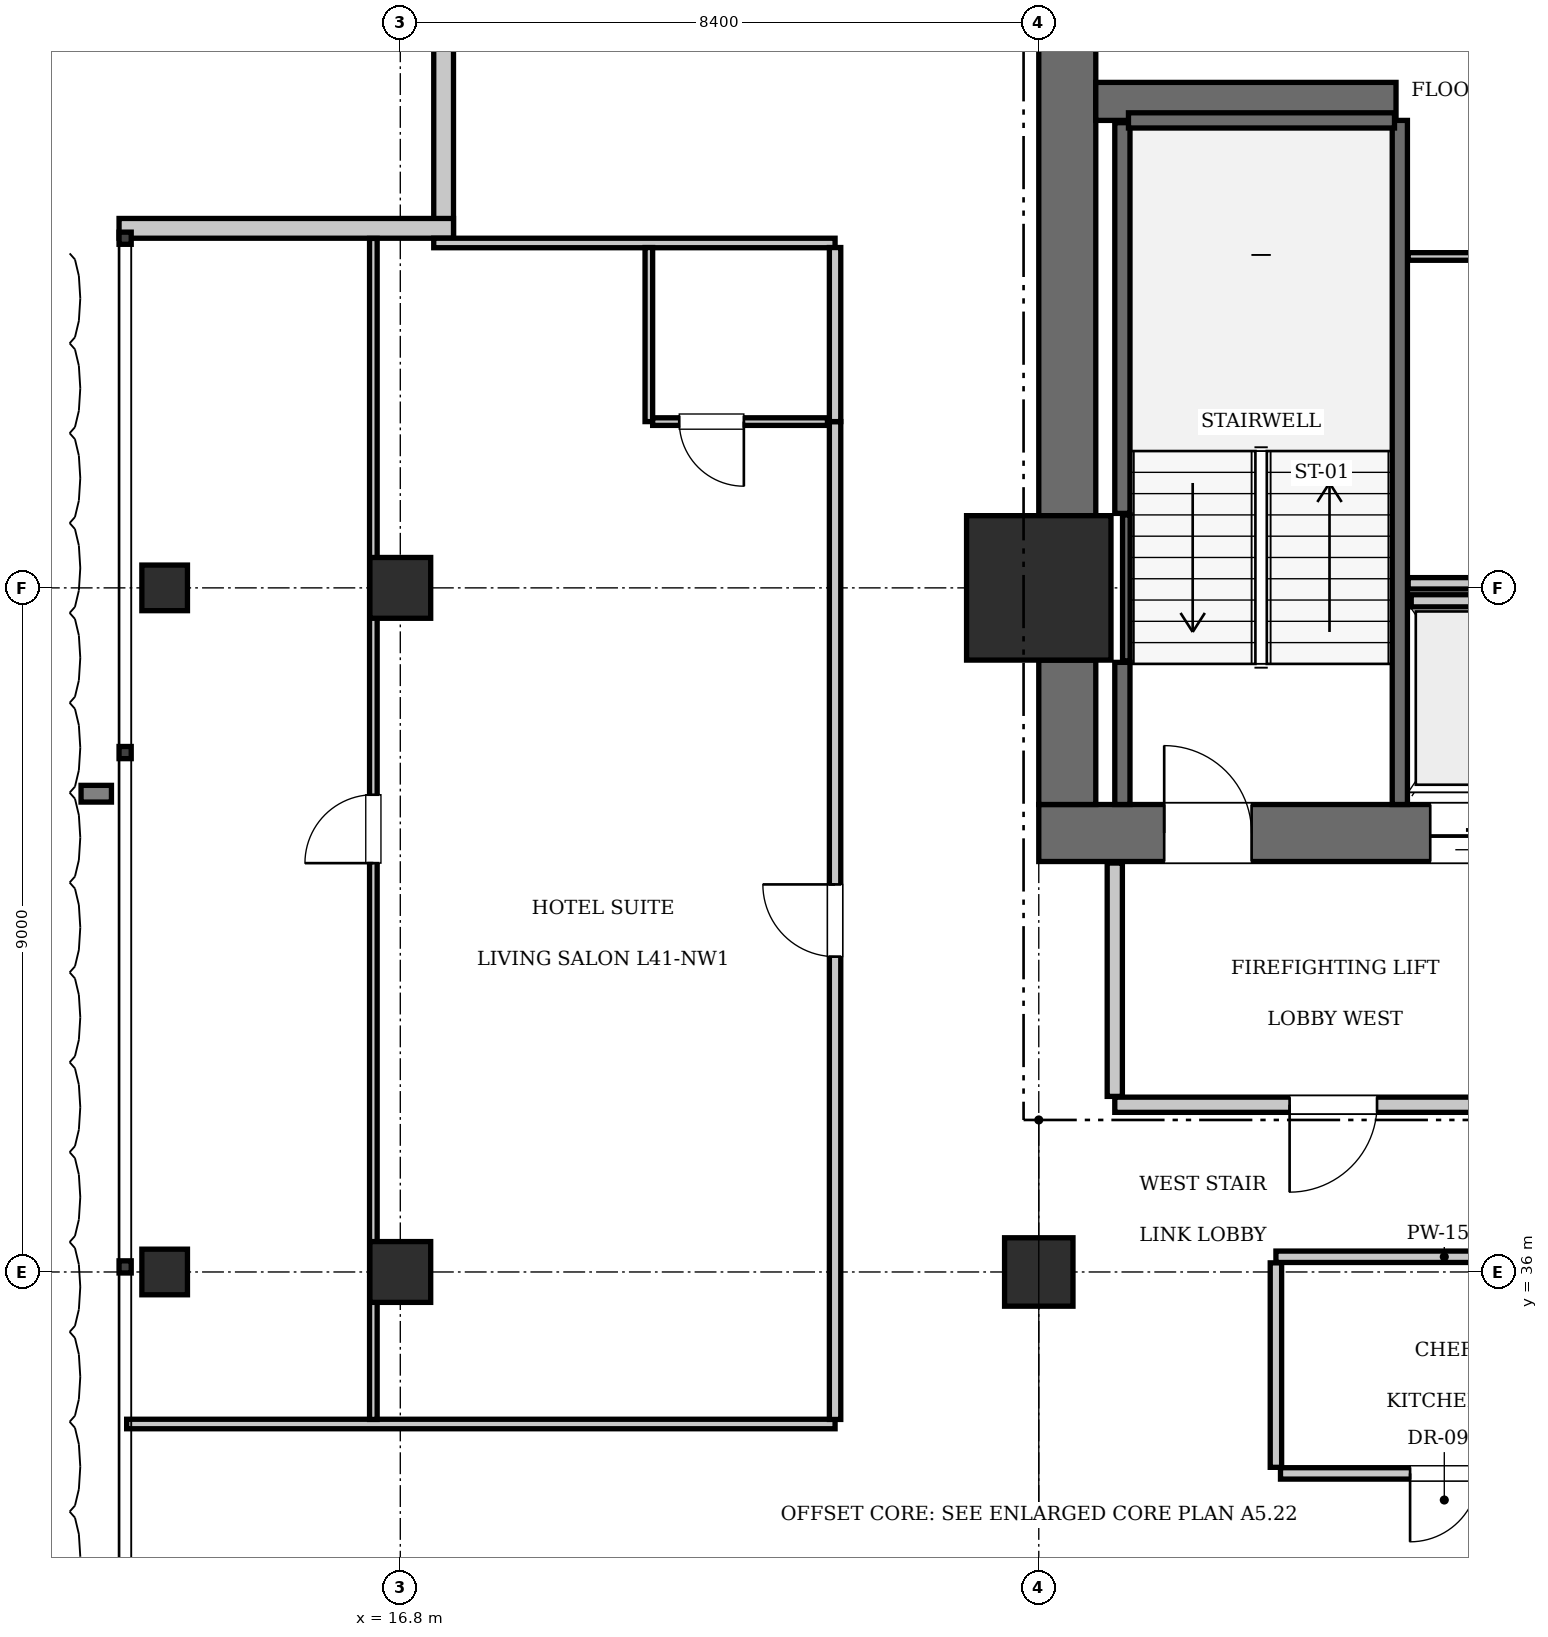
"""IFC4 building model, lengths in metres.
Left out: names, types, materials, properties, quantities, classifications, styles, units other than length and angle.
Written with IfcOpenShell. Run it as: python <this file> out.ifc"""

import sys

from ifc_helpers import new_model, si_unit, direction, frame, frame_2d, origin, origin_2d, place, context, subcontext, project, spatial, rectangle, i_section, extrude, element, fill, save


model = new_model("IFC4")
c1 = context("Model", 3, precision=1e-05, world=origin(), true_north=direction((0.0, 1.0)))
c2 = subcontext(c1, "Body", "Model", "MODEL_VIEW")
j1 = project(units=[si_unit("LENGTHUNIT", "METRE"), si_unit("PLANEANGLEUNIT", "RADIAN")], contexts=[c1])
p1 = place(None, origin())
s1 = spatial("IfcSite", under=j1, at=p1, CompositionType="ELEMENT")
p2 = place(p1, origin())
s2 = spatial("IfcBuilding", under=s1, at=p2, CompositionType="ELEMENT")
p3 = place(p2, frame((0.0, 0.0, 169.75)))
s3 = spatial("IfcBuildingStorey", under=s2, at=p3, CompositionType="ELEMENT", Elevation=169.75)
p4 = place(p3, frame((25.2, 45.0, 0.0), z_axis=(0.0, 0.0, 1.0), x_axis=(1.0, 0.0, 0.0)))
e1 = element("IfcColumn", 1, at=p4, inside=s3, PredefinedType="COLUMN", context=c2, shape_type="SweptSolid", body=[
    extrude(rectangle(XDim=1.9, YDim=1.9, at=origin_2d()), origin(), (0.0, 0.0, 1.0), 3.85),
])
p5 = place(p3, frame((25.2, 41.775, 0.0), z_axis=(0.0, 0.0, 1.0), x_axis=(1.0, 0.0, 0.0)))
e2 = element("IfcWall", 2, at=p5, inside=s3, PredefinedType="SHEAR", context=c2, shape_type="SweptSolid", body=[
    extrude(rectangle(XDim=6.8, YDim=0.75, at=frame_2d((3.4, 0.0))), origin(), (0.0, 0.0, 1.0), 3.85),
])
p6 = place(p5, frame((1.65, 0.0, 0.0)))
e3 = element("IfcOpeningElement", 3, at=p6, cuts=e2, PredefinedType="OPENING", context=c2, shape_type="SweptSolid", body=[
    extrude(rectangle(XDim=1.15, YDim=2.15, at=frame_2d((0.575, 1.075))), frame((0.0, 0.385, 0.0), z_axis=(0.0, -1.0, 0.0), x_axis=(1.0, 0.0, 0.0)), (0.0, 0.0, 1.0), 0.77),
])
p7 = place(p5, frame((5.15, 0.0, 0.0)))
e4 = element("IfcOpeningElement", 4, at=p7, cuts=e2, PredefinedType="OPENING", context=c2, shape_type="SweptSolid", body=[
    extrude(rectangle(XDim=1.1, YDim=2.2, at=frame_2d((0.55, 1.1))), frame((0.0, 0.385, 0.0), z_axis=(0.0, -1.0, 0.0), x_axis=(1.0, 0.0, 0.0)), (0.0, 0.0, 1.0), 0.77),
])
p8 = place(p3, frame((25.575, 42.15, 0.0), z_axis=(0.0, 0.0, 1.0), x_axis=(0.0, 1.0, 0.0)))
e5 = element("IfcWall", 5, at=p8, inside=s3, PredefinedType="SHEAR", context=c2, shape_type="SweptSolid", body=[
    extrude(rectangle(XDim=1.9, YDim=0.75, at=frame_2d((0.95, 0.0))), origin(), (0.0, 0.0, 1.0), 3.85),
])
p9 = place(p3, frame((25.575, 45.95, 0.0), z_axis=(0.0, 0.0, 1.0), x_axis=(0.0, 1.0, 0.0)))
e6 = element("IfcWall", 6, at=p9, inside=s3, PredefinedType="SHEAR", context=c2, shape_type="SweptSolid", body=[
    extrude(rectangle(XDim=7.3, YDim=0.75, at=frame_2d((3.65, 0.0))), origin(), (0.0, 0.0, 1.0), 3.85),
])
p10 = place(p3, frame((25.95, 51.4, 0.0), z_axis=(0.0, 0.0, 1.0), x_axis=(1.0, 0.0, 0.0)))
e7 = element("IfcWall", 7, at=p10, inside=s3, PredefinedType="SHEAR", context=c2, shape_type="SweptSolid", body=[
    extrude(rectangle(XDim=3.95, YDim=0.5, at=frame_2d((1.975, 0.0))), origin(), (0.0, 0.0, 1.0), 3.85),
])
p11 = place(p3, frame((25.2, 36.0, 0.0), z_axis=(0.0, 0.0, 1.0), x_axis=(1.0, 0.0, 0.0)))
e8 = element("IfcColumn", 8, at=p11, inside=s3, PredefinedType="COLUMN", context=c2, shape_type="SweptSolid", body=[
    extrude(rectangle(XDim=0.9, YDim=0.9, at=origin_2d()), origin(), (0.0, 0.0, 1.0), 3.85),
])
for number, where, z_axis, x_axis in (
    (9, (16.8, 36.0, 0.0), (0.0, 0.0, 1.0), (1.0, 0.0, 0.0)),
    (10, (16.8, 45.0, 0.0), (0.0, 0.0, 1.0), (1.0, 0.0, 0.0)),
):
    element("IfcColumn", number, at=place(p3, frame(where, z_axis=z_axis, x_axis=x_axis)), inside=s3, PredefinedType="COLUMN", context=c2, shape_type="SweptSolid", body=[
        extrude(rectangle(XDim=0.8, YDim=0.8, at=origin_2d()), origin(), (0.0, 0.0, 1.0), 3.85),
    ])
for number, where, z_axis, x_axis in (
    (11, (13.7, 36.0, 0.0), (0.0, 0.0, 1.0), (1.0, 0.0, 0.0)),
    (12, (13.7, 45.0, 0.0), (0.0, 0.0, 1.0), (1.0, 0.0, 0.0)),
):
    element("IfcColumn", number, at=place(p3, frame(where, z_axis=z_axis, x_axis=x_axis)), inside=s3, PredefinedType="COLUMN", context=c2, shape_type="SweptSolid", body=[
        extrude(i_section(OverallWidth=0.6, OverallDepth=0.6, WebThickness=0.025, FlangeThickness=0.038, at=origin_2d()), origin(), (0.0, 0.0, 1.0), 3.85),
    ])
p12 = place(p3, frame((29.95, 42.15, 0.0), z_axis=(0.0, 0.0, 1.0), x_axis=(0.0, 1.0, 0.0)))
e13 = element("IfcWall", 13, at=p12, inside=s3, PredefinedType="SOLIDWALL", context=c2, shape_type="SweptSolid", body=[
    extrude(rectangle(XDim=9.0, YDim=0.2, at=frame_2d((4.5, 0.0))), origin(), (0.0, 0.0, 1.0), 3.61),
])
p13 = place(p3, frame((26.3, 42.15, 0.0), z_axis=(0.0, 0.0, 1.0), x_axis=(0.0, 1.0, 0.0)))
e14 = element("IfcWall", 14, at=p13, inside=s3, PredefinedType="SOLIDWALL", context=c2, shape_type="SweptSolid", body=[
    extrude(rectangle(XDim=1.87, YDim=0.2, at=frame_2d((0.935, 0.0))), origin(), (0.0, 0.0, 1.0), 3.61),
])
p14 = place(p3, frame((26.3, 45.98, 0.0), z_axis=(0.0, 0.0, 1.0), x_axis=(0.0, 1.0, 0.0)))
e15 = element("IfcWall", 15, at=p14, inside=s3, PredefinedType="SOLIDWALL", context=c2, shape_type="SweptSolid", body=[
    extrude(rectangle(XDim=5.14, YDim=0.2, at=frame_2d((2.57, 0.0))), origin(), (0.0, 0.0, 1.0), 3.61),
])
p15 = place(p3, frame((26.38, 51.15, 0.0), z_axis=(0.0, 0.0, 1.0), x_axis=(1.0, 0.0, 0.0)))
e16 = element("IfcWall", 16, at=p15, inside=s3, PredefinedType="SOLIDWALL", context=c2, shape_type="SweptSolid", body=[
    extrude(rectangle(XDim=3.5, YDim=0.2, at=frame_2d((1.75, 0.0))), origin(), (0.0, 0.0, 1.0), 3.61),
])
p16 = place(p3, frame((26.352, 44.04, 0.0), z_axis=(0.0, 0.0, 1.0), x_axis=(0.0, 1.0, 0.0)))
e17 = element("IfcWall", 17, at=p16, inside=s3, PredefinedType="SOLIDWALL", context=c2, shape_type="SweptSolid", body=[
    extrude(rectangle(XDim=1.92, YDim=0.1, at=frame_2d((0.96, 0.0))), origin(), (0.0, 0.0, 1.0), 3.61),
])
p17 = place(p3, frame((30.1, 44.83, 0.0), z_axis=(0.0, 0.0, 1.0), x_axis=(1.0, 0.0, 0.0)))
e18 = element("IfcWall", 18, at=p17, inside=s3, PredefinedType="SOLIDWALL", context=c2, shape_type="SweptSolid", body=[
    extrude(rectangle(XDim=1.6, YDim=0.16, at=frame_2d((0.8, 0.0))), origin(), (0.0, 0.0, 1.0), 3.61),
])
for number, where, z_axis, x_axis in (
    (19, (17.37, 49.6, 0.0), (0.0, 0.0, 1.0), (0.0, 1.0, 0.0)),
    (20, (13.1, 49.73, 0.0), (0.0, 0.0, 1.0), (1.0, 0.0, 0.0)),
):
    element("IfcWall", number, at=place(p3, frame(where, z_axis=z_axis, x_axis=x_axis)), inside=s3, PredefinedType="SOLIDWALL", context=c2, shape_type="SweptSolid", body=[
        extrude(rectangle(XDim=4.4, YDim=0.26, at=frame_2d((2.2, 0.0))), origin(), (0.0, 0.0, 1.0), 3.61),
    ])
p18 = place(p3, frame((26.2, 38.2, 0.0), z_axis=(0.0, 0.0, 1.0), x_axis=(1.0, 0.0, 0.0)))
e21 = element("IfcWall", 21, at=p18, inside=s3, PredefinedType="PARTITIONING", context=c2, shape_type="SweptSolid", body=[
    extrude(rectangle(XDim=5.8, YDim=0.2, at=frame_2d((2.9, 0.0))), origin(), (0.0, 0.0, 1.0), 3.61),
])
p19 = place(p18, frame((2.3, 0.0, 0.0)))
e22 = element("IfcOpeningElement", 22, at=p19, cuts=e21, PredefinedType="OPENING", context=c2, shape_type="SweptSolid", body=[
    extrude(rectangle(XDim=1.15, YDim=2.15, at=frame_2d((0.575, 1.075))), frame((0.0, 0.11, 0.0), z_axis=(0.0, -1.0, 0.0), x_axis=(1.0, 0.0, 0.0)), (0.0, 0.0, 1.0), 0.22),
])
p20 = place(p3, frame((26.2, 38.31, 0.0), z_axis=(0.0, 0.0, 1.0), x_axis=(0.0, 1.0, 0.0)))
e23 = element("IfcWall", 23, at=p20, inside=s3, PredefinedType="PARTITIONING", context=c2, shape_type="SweptSolid", body=[
    extrude(rectangle(XDim=3.07, YDim=0.2, at=frame_2d((1.535, 0.0))), origin(), (0.0, 0.0, 1.0), 3.61),
])
p21 = place(p3, frame((30.06, 45.06, 0.0), z_axis=(0.0, 0.0, 1.0), x_axis=(1.0, 0.0, 0.0)))
e24 = element("IfcWall", 24, at=p21, inside=s3, PredefinedType="PARTITIONING", context=c2, shape_type="SweptSolid", body=[
    extrude(rectangle(XDim=3.18, YDim=0.15, at=frame_2d((1.59, 0.0))), origin(), (0.0, 0.0, 1.0), 3.61),
])
p22 = place(p3, frame((30.06, 49.36, 0.0), z_axis=(0.0, 0.0, 1.0), x_axis=(1.0, 0.0, 0.0)))
e25 = element("IfcWall", 25, at=p22, inside=s3, PredefinedType="PARTITIONING", context=c2, shape_type="SweptSolid", body=[
    extrude(rectangle(XDim=3.18, YDim=0.1, at=frame_2d((1.59, 0.0))), origin(), (0.0, 0.0, 1.0), 3.61),
])
p23 = place(p22, frame((1.95, 0.0, 0.0)))
e26 = element("IfcOpeningElement", 26, at=p23, cuts=e25, PredefinedType="OPENING", context=c2, shape_type="SweptSolid", body=[
    extrude(rectangle(XDim=0.8, YDim=2.05, at=frame_2d((0.4, 1.025))), frame((0.0, 0.06, 0.0), z_axis=(0.0, -1.0, 0.0), x_axis=(1.0, 0.0, 0.0)), (0.0, 0.0, 1.0), 0.12),
])
p24 = place(p3, frame((28.32, 36.2, 0.0), z_axis=(0.0, 0.0, 1.0), x_axis=(1.0, 0.0, 0.0)))
e27 = element("IfcWall", 27, at=p24, inside=s3, PredefinedType="PARTITIONING", context=c2, shape_type="SweptSolid", body=[
    extrude(rectangle(XDim=4.43, YDim=0.15, at=frame_2d((2.215, 0.0))), origin(), (0.0, 0.0, 1.0), 3.61),
])
p25 = place(p3, frame((28.32, 33.43, 0.0), z_axis=(0.0, 0.0, 1.0), x_axis=(0.0, 1.0, 0.0)))
e28 = element("IfcWall", 28, at=p25, inside=s3, PredefinedType="PARTITIONING", context=c2, shape_type="SweptSolid", body=[
    extrude(rectangle(XDim=2.69, YDim=0.15, at=frame_2d((1.345, 0.0))), origin(), (0.0, 0.0, 1.0), 3.61),
])
p26 = place(p3, frame((28.38, 33.35, 0.0), z_axis=(0.0, 0.0, 1.0), x_axis=(1.0, 0.0, 0.0)))
e29 = element("IfcWall", 29, at=p26, inside=s3, PredefinedType="PARTITIONING", context=c2, shape_type="SweptSolid", body=[
    extrude(rectangle(XDim=4.31, YDim=0.15, at=frame_2d((2.155, 0.0))), origin(), (0.0, 0.0, 1.0), 3.61),
])
p27 = place(p26, frame((1.705, 0.0, 0.0)))
e30 = element("IfcOpeningElement", 30, at=p27, cuts=e29, PredefinedType="OPENING", context=c2, shape_type="SweptSolid", body=[
    extrude(rectangle(XDim=0.9, YDim=2.1, at=frame_2d((0.45, 1.05))), frame((0.0, 0.085, 0.0), z_axis=(0.0, -1.0, 0.0), x_axis=(1.0, 0.0, 0.0)), (0.0, 0.0, 1.0), 0.17),
])
p28 = place(p3, frame((13.2, 34.0, 0.0), z_axis=(0.0, 0.0, 1.0), x_axis=(1.0, 0.0, 0.0)))
e31 = element("IfcWall", 31, at=p28, inside=s3, PredefinedType="PARTITIONING", context=c2, shape_type="SweptSolid", body=[
    extrude(rectangle(XDim=9.32, YDim=0.125, at=frame_2d((4.66, 0.0))), origin(), (0.0, 0.0, 1.0), 3.61),
])
p29 = place(p3, frame((17.24, 49.538, 0.0), z_axis=(0.0, 0.0, 1.0), x_axis=(1.0, 0.0, 0.0)))
e32 = element("IfcWall", 32, at=p29, inside=s3, PredefinedType="PARTITIONING", context=c2, shape_type="SweptSolid", body=[
    extrude(rectangle(XDim=5.28, YDim=0.125, at=frame_2d((2.64, 0.0))), origin(), (0.0, 0.0, 1.0), 3.61),
])
p30 = place(p3, frame((22.52, 34.06, 0.0), z_axis=(0.0, 0.0, 1.0), x_axis=(0.0, 1.0, 0.0)))
e33 = element("IfcWall", 33, at=p30, inside=s3, PredefinedType="PARTITIONING", context=c2, shape_type="SweptSolid", body=[
    extrude(rectangle(XDim=13.127, YDim=0.15, at=frame_2d((6.564, 0.0))), origin(), (0.0, 0.0, 1.0), 3.61),
])
p31 = place(p30, frame((6.089, 0.0, 0.0)))
e34 = element("IfcOpeningElement", 34, at=p31, cuts=e33, PredefinedType="OPENING", context=c2, shape_type="SweptSolid", body=[
    extrude(rectangle(XDim=0.95, YDim=2.15, at=frame_2d((0.475, 1.075))), frame((0.0, 0.085, 0.0), z_axis=(0.0, -1.0, 0.0), x_axis=(1.0, 0.0, 0.0)), (0.0, 0.0, 1.0), 0.17),
])
p32 = place(p3, frame((22.52, 47.188, 0.0), z_axis=(0.0, 0.0, 1.0), x_axis=(0.0, 1.0, 0.0)))
e35 = element("IfcWall", 35, at=p32, inside=s3, PredefinedType="PARTITIONING", context=c2, shape_type="SweptSolid", body=[
    extrude(rectangle(XDim=2.29, YDim=0.15, at=frame_2d((1.145, 0.0))), origin(), (0.0, 0.0, 1.0), 3.61),
])
p33 = place(p3, frame((20.07, 47.188, 0.0), z_axis=(0.0, 0.0, 1.0), x_axis=(0.0, 1.0, 0.0)))
e36 = element("IfcWall", 36, at=p33, inside=s3, PredefinedType="PARTITIONING", context=c2, shape_type="SweptSolid", body=[
    extrude(rectangle(XDim=2.29, YDim=0.1, at=frame_2d((1.145, 0.0))), origin(), (0.0, 0.0, 1.0), 3.61),
])
p34 = place(p3, frame((20.12, 47.188, 0.0), z_axis=(0.0, 0.0, 1.0), x_axis=(1.0, 0.0, 0.0)))
e37 = element("IfcWall", 37, at=p34, inside=s3, PredefinedType="PARTITIONING", context=c2, shape_type="SweptSolid", body=[
    extrude(rectangle(XDim=2.3, YDim=0.1, at=frame_2d((1.15, 0.0))), origin(), (0.0, 0.0, 1.0), 3.61),
])
p35 = place(p34, frame((0.35, 0.0, 0.0)))
e38 = element("IfcOpeningElement", 38, at=p35, cuts=e37, PredefinedType="OPENING", context=c2, shape_type="SweptSolid", body=[
    extrude(rectangle(XDim=0.85, YDim=2.1, at=frame_2d((0.425, 1.05))), frame((0.0, 0.06, 0.0), z_axis=(0.0, -1.0, 0.0), x_axis=(1.0, 0.0, 0.0)), (0.0, 0.0, 1.0), 0.12),
])
p36 = place(p3, frame((16.446, 34.06, 0.0), z_axis=(0.0, 0.0, 1.0), x_axis=(0.0, 1.0, 0.0)))
e39 = element("IfcWall", 39, at=p36, inside=s3, PredefinedType="PARTITIONING", context=c2, shape_type="SweptSolid", body=[
    extrude(rectangle(XDim=15.537, YDim=0.1, at=frame_2d((7.769, 0.0))), origin(), (0.0, 0.0, 1.0), 3.61),
])
p37 = place(p36, frame((7.319, 0.0, 0.0)))
e40 = element("IfcOpeningElement", 40, at=p37, cuts=e39, PredefinedType="OPENING", context=c2, shape_type="SweptSolid", body=[
    extrude(rectangle(XDim=0.9, YDim=2.1, at=frame_2d((0.45, 1.05))), frame((0.0, 0.06, 0.0), z_axis=(0.0, -1.0, 0.0), x_axis=(1.0, 0.0, 0.0)), (0.0, 0.0, 1.0), 0.12),
])
p38 = place(p6, origin())
e41 = element("IfcDoor", 41, at=p38, inside=s3, OperationType="SINGLE_SWING_LEFT", PredefinedType="DOOR", context=c2, shape_type="SweptSolid", body=[
    extrude(rectangle(XDim=1.15, YDim=2.15, at=frame_2d((0.575, 1.075))), frame((0.0, 0.025, 0.0), z_axis=(0.0, -1.0, 0.0), x_axis=(1.0, 0.0, 0.0)), (0.0, 0.0, 1.0), 0.05),
])
fill(e3, e41)
p39 = place(p7, frame((1.1, 0.0, 0.0), z_axis=(0.0, 0.0, 1.0), x_axis=(-1.0, 0.0, 0.0)))
e42 = element("IfcDoor", 42, at=p39, inside=s3, OperationType="SLIDING_TO_LEFT", PredefinedType="DOOR", context=c2, shape_type="SweptSolid", body=[
    extrude(rectangle(XDim=1.1, YDim=2.2, at=frame_2d((0.55, 1.1))), frame((0.0, 0.025, 0.0), z_axis=(0.0, -1.0, 0.0), x_axis=(1.0, 0.0, 0.0)), (0.0, 0.0, 1.0), 0.05),
])
fill(e4, e42)
p40 = place(p19, frame((1.15, 0.0, 0.0), z_axis=(0.0, 0.0, 1.0), x_axis=(-1.0, 0.0, 0.0)))
e43 = element("IfcDoor", 43, at=p40, inside=s3, OperationType="SINGLE_SWING_RIGHT", PredefinedType="DOOR", context=c2, shape_type="SweptSolid", body=[
    extrude(rectangle(XDim=1.15, YDim=2.15, at=frame_2d((0.575, 1.075))), frame((0.0, 0.025, 0.0), z_axis=(0.0, -1.0, 0.0), x_axis=(1.0, 0.0, 0.0)), (0.0, 0.0, 1.0), 0.05),
])
fill(e22, e43)
p41 = place(p27, frame((0.9, 0.0, 0.0), z_axis=(0.0, 0.0, 1.0), x_axis=(-1.0, 0.0, 0.0)))
e44 = element("IfcDoor", 44, at=p41, inside=s3, OperationType="SINGLE_SWING_RIGHT", PredefinedType="DOOR", context=c2, shape_type="SweptSolid", body=[
    extrude(rectangle(XDim=0.9, YDim=2.1, at=frame_2d((0.45, 1.05))), frame((0.0, 0.025, 0.0), z_axis=(0.0, -1.0, 0.0), x_axis=(1.0, 0.0, 0.0)), (0.0, 0.0, 1.0), 0.05),
])
fill(e30, e44)
p42 = place(p35, frame((0.85, 0.0, 0.0), z_axis=(0.0, 0.0, 1.0), x_axis=(-1.0, 0.0, 0.0)))
e45 = element("IfcDoor", 45, at=p42, inside=s3, OperationType="SINGLE_SWING_LEFT", PredefinedType="DOOR", context=c2, shape_type="SweptSolid", body=[
    extrude(rectangle(XDim=0.85, YDim=2.1, at=frame_2d((0.425, 1.05))), frame((0.0, 0.025, 0.0), z_axis=(0.0, -1.0, 0.0), x_axis=(1.0, 0.0, 0.0)), (0.0, 0.0, 1.0), 0.05),
])
fill(e38, e45)
p43 = place(p31, origin())
e46 = element("IfcDoor", 46, at=p43, inside=s3, OperationType="SINGLE_SWING_RIGHT", PredefinedType="DOOR", context=c2, shape_type="SweptSolid", body=[
    extrude(rectangle(XDim=0.95, YDim=2.15, at=frame_2d((0.475, 1.075))), frame((0.0, 0.025, 0.0), z_axis=(0.0, -1.0, 0.0), x_axis=(1.0, 0.0, 0.0)), (0.0, 0.0, 1.0), 0.05),
])
fill(e34, e46)
p44 = place(p37, origin())
e47 = element("IfcDoor", 47, at=p44, inside=s3, OperationType="SINGLE_SWING_LEFT", PredefinedType="DOOR", context=c2, shape_type="SweptSolid", body=[
    extrude(rectangle(XDim=0.9, YDim=2.1, at=frame_2d((0.45, 1.05))), frame((0.0, 0.025, 0.0), z_axis=(0.0, -1.0, 0.0), x_axis=(1.0, 0.0, 0.0)), (0.0, 0.0, 1.0), 0.05),
])
fill(e40, e47)
save(model, sys.argv[1])
